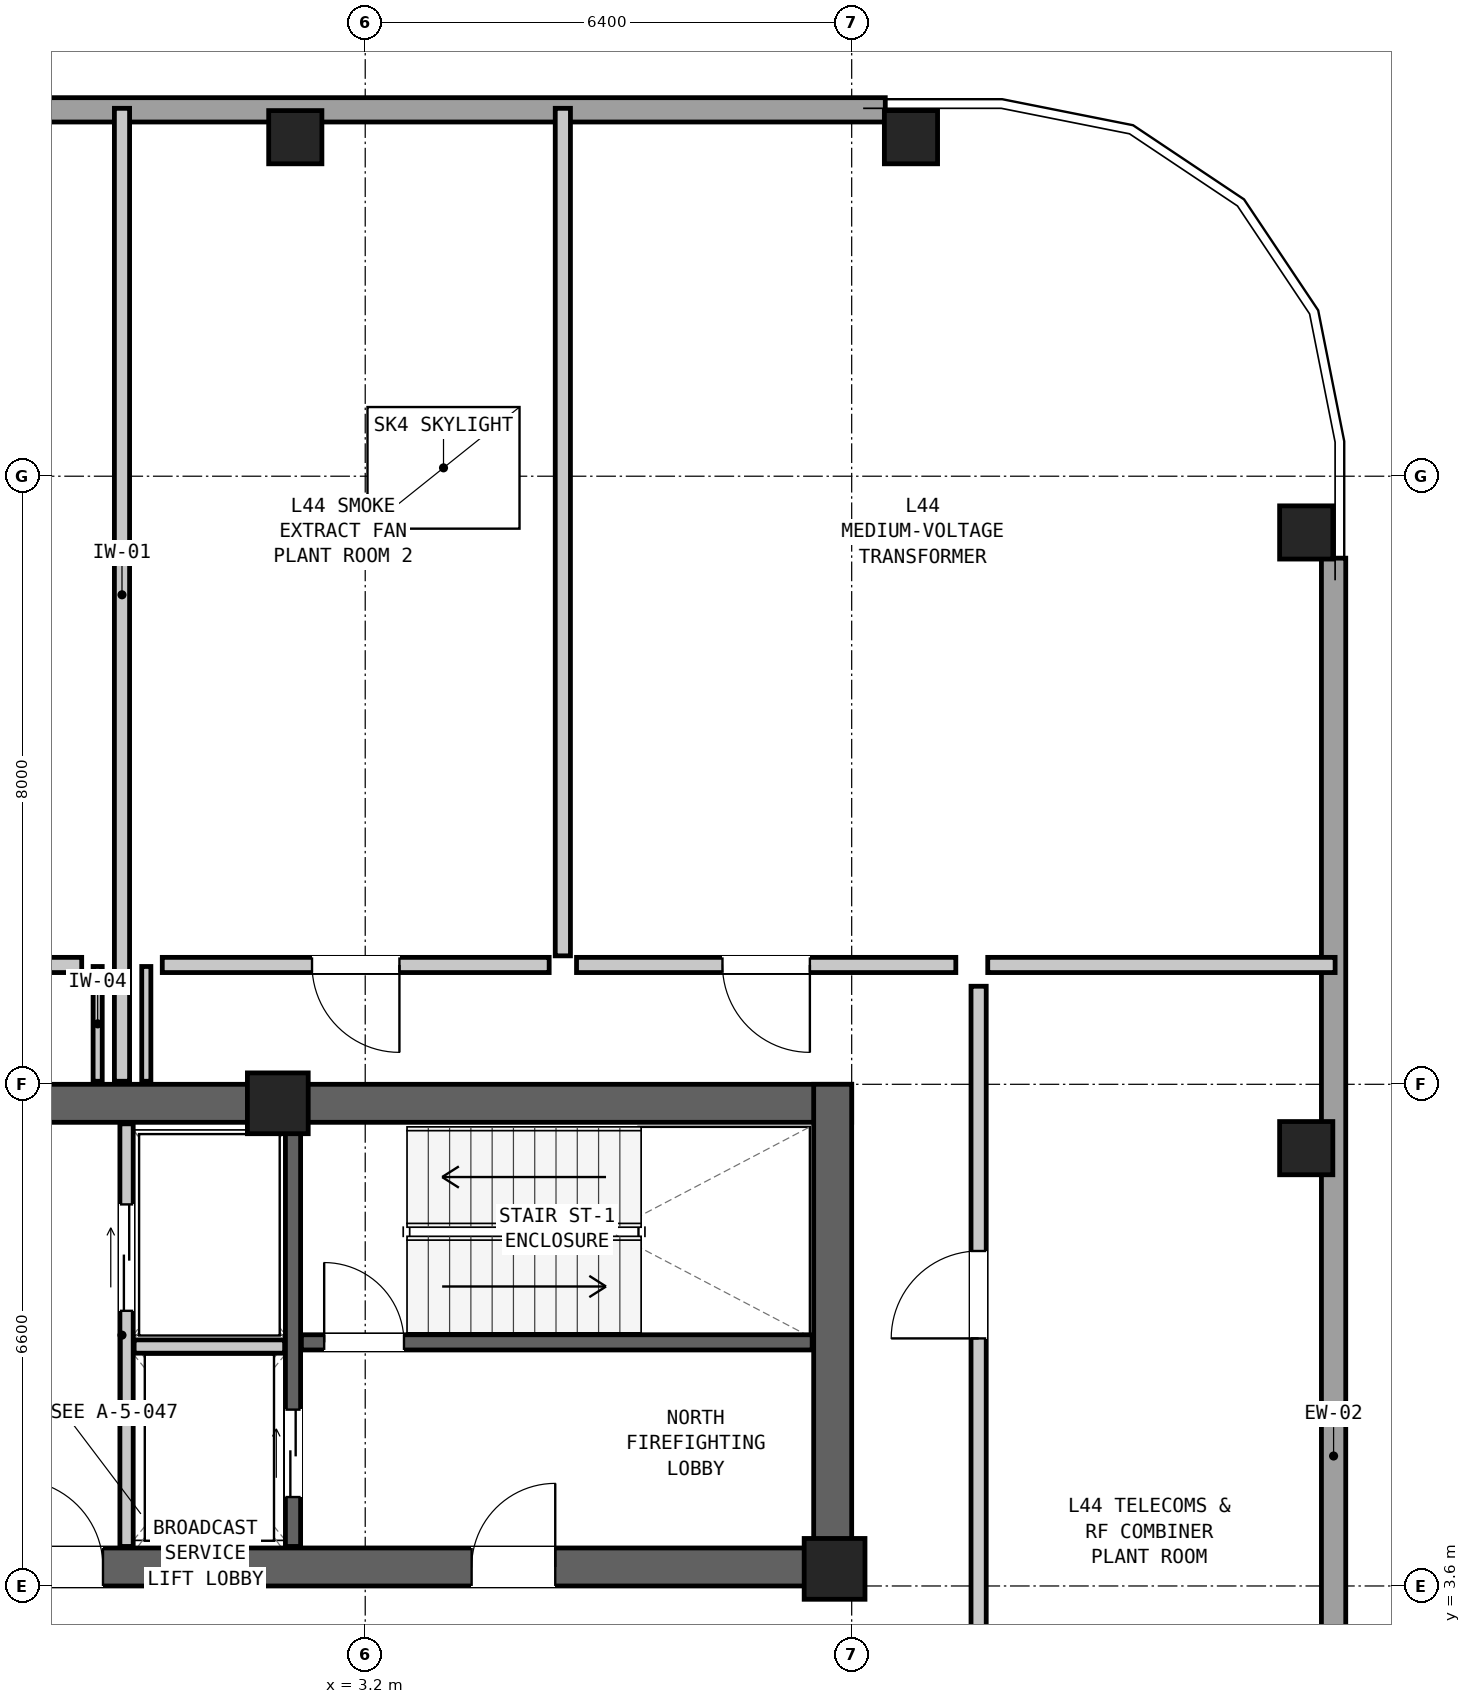
"""IFC4 building model, lengths in metres.
Left out: names, types, materials, properties, quantities, classifications, styles, units other than length and angle.
Written with IfcOpenShell. Run it as: python <this file> out.ifc"""

import sys

from ifc_helpers import new_model, si_unit, direction, frame, frame_2d, origin, origin_2d, place, context, subcontext, project, spatial, rectangle, hollow_rectangle, extrude, element, fill, save


model = new_model("IFC4")
c1 = context("Model", 3, precision=1e-05, world=origin(), true_north=direction((0.0, 1.0)))
c2 = subcontext(c1, "Body", "Model", "MODEL_VIEW")
j1 = project(units=[si_unit("LENGTHUNIT", "METRE"), si_unit("PLANEANGLEUNIT", "RADIAN")], contexts=[c1])
p1 = place(None, origin())
s1 = spatial("IfcSite", under=j1, at=p1, CompositionType="ELEMENT")
p2 = place(p1, origin())
s2 = spatial("IfcBuilding", under=s1, at=p2, CompositionType="ELEMENT")
p3 = place(p2, frame((0.0, 0.0, 151.8)))
s3 = spatial("IfcBuildingStorey", under=s2, at=p3, CompositionType="ELEMENT", Elevation=151.8)
p4 = place(p3, frame((-9.6, 9.95, 0.0), z_axis=(0.0, 0.0, 1.0), x_axis=(1.0, 0.0, 0.0)))
e1 = element("IfcWall", 1, at=p4, inside=s3, PredefinedType="SHEAR", context=c2, shape_type="SweptSolid", body=[
    extrude(rectangle(XDim=19.2, YDim=0.5, at=frame_2d((9.6, 0.0))), origin(), (0.0, 0.0, 1.0), 4.35),
])
p5 = place(p3, frame((-9.6, 3.85, 0.0), z_axis=(0.0, 0.0, 1.0), x_axis=(1.0, 0.0, 0.0)))
e2 = element("IfcWall", 2, at=p5, inside=s3, PredefinedType="SHEAR", context=c2, shape_type="SweptSolid", body=[
    extrude(rectangle(XDim=19.2, YDim=0.5, at=frame_2d((9.6, 0.0))), origin(), (0.0, 0.0, 1.0), 4.35),
])
p6 = place(p5, frame((14.2, 0.0, 0.0)))
e3 = element("IfcOpeningElement", 3, at=p6, cuts=e2, PredefinedType="OPENING", context=c2, shape_type="SweptSolid", body=[
    extrude(rectangle(XDim=1.1, YDim=2.08, at=frame_2d((0.55, 1.04))), frame((0.0, 0.262, 0.0), z_axis=(0.0, -1.0, 0.0), x_axis=(1.0, 0.0, 0.0)), (0.0, 0.0, 1.0), 0.524),
])
p7 = place(p5, frame((8.2, 0.0, 0.0)))
e4 = element("IfcOpeningElement", 4, at=p7, cuts=e2, PredefinedType="OPENING", context=c2, shape_type="SweptSolid", body=[
    extrude(rectangle(XDim=1.15, YDim=2.1, at=frame_2d((0.575, 1.05))), frame((0.0, 0.262, 0.0), z_axis=(0.0, -1.0, 0.0), x_axis=(1.0, 0.0, 0.0)), (0.0, 0.0, 1.0), 0.524),
])
p8 = place(p5, frame((2.5, 0.0, 0.0)))
e5 = element("IfcOpeningElement", 5, at=p8, cuts=e2, PredefinedType="OPENING", context=c2, shape_type="SweptSolid", body=[
    extrude(rectangle(XDim=1.6, YDim=2.12, at=frame_2d((0.8, 1.06))), frame((0.0, 0.262, 0.0), z_axis=(0.0, -1.0, 0.0), x_axis=(1.0, 0.0, 0.0)), (0.0, 0.0, 1.0), 0.524),
])
p9 = place(p3, frame((9.35, 3.6, 0.0), z_axis=(0.0, 0.0, 1.0), x_axis=(0.0, 1.0, 0.0)))
e6 = element("IfcWall", 6, at=p9, inside=s3, PredefinedType="SHEAR", context=c2, shape_type="SweptSolid", body=[
    extrude(rectangle(XDim=6.6, YDim=0.5, at=frame_2d((3.3, 0.0))), origin(), (0.0, 0.0, 1.0), 4.35),
])
for number, where, z_axis, x_axis in (
    (7, (15.58, 9.36, 0.0), (0.0, 0.0, 1.0), (0.0, 1.0, 0.0)),
    (8, (15.58, 17.46, 0.0), (0.0, 0.0, 1.0), (0.0, 1.0, 0.0)),
    (9, (10.38, 22.66, 0.0), (0.0, 0.0, 1.0), (1.0, 0.0, 0.0)),
    (10, (2.28, 22.66, 0.0), (0.0, 0.0, 1.0), (1.0, 0.0, 0.0)),
):
    element("IfcColumn", number, at=place(p3, frame(where, z_axis=z_axis, x_axis=x_axis)), inside=s3, PredefinedType="COLUMN", context=c2, shape_type="SweptSolid", body=[
        extrude(hollow_rectangle(XDim=0.7, YDim=0.7, WallThickness=0.045, at=origin_2d()), origin(), (0.0, 0.0, 1.0), 4.35),
    ])
for number, where, z_axis, x_axis in (
    (11, (2.05, 9.95, 0.0), (0.0, 0.0, 1.0), (1.0, 0.0, 0.0)),
    (12, (9.375, 3.825, 0.0), (0.0, 0.0, 1.0), (1.0, 0.0, 0.0)),
):
    element("IfcColumn", number, at=place(p3, frame(where, z_axis=z_axis, x_axis=x_axis)), inside=s3, PredefinedType="COLUMN", context=c2, shape_type="SweptSolid", body=[
        extrude(rectangle(XDim=0.8, YDim=0.8, at=origin_2d()), origin(), (0.0, 0.0, 1.0), 4.35),
    ])
p10 = place(p3, frame((15.94, 17.122, 0.0), z_axis=(0.0, 0.0, 1.0), x_axis=(0.0, -1.0, 0.0)))
e13 = element("IfcWall", 13, at=p10, inside=s3, PredefinedType="SOLIDWALL", context=c2, shape_type="SweptSolid", body=[
    extrude(rectangle(XDim=23.624, YDim=0.32, at=frame_2d((11.812, 0.0))), origin(), (0.0, 0.0, 1.0), 2.31),
])
p11 = place(p3, frame((-13.582, 23.02, 0.0), z_axis=(0.0, 0.0, 1.0), x_axis=(1.0, 0.0, 0.0)))
e14 = element("IfcWall", 14, at=p11, inside=s3, PredefinedType="SOLIDWALL", context=c2, shape_type="SweptSolid", body=[
    extrude(rectangle(XDim=23.624, YDim=0.32, at=frame_2d((11.812, 0.0))), origin(), (0.0, 0.0, 1.0), 2.11),
])
p12 = place(p3, frame((2.36, 6.805, 0.0), z_axis=(0.0, 0.0, 1.0), x_axis=(1.0, 0.0, 0.0)))
e15 = element("IfcWall", 15, at=p12, inside=s3, PredefinedType="SHEAR", context=c2, shape_type="SweptSolid", body=[
    extrude(rectangle(XDim=6.72, YDim=0.2, at=frame_2d((3.36, 0.0))), origin(), (0.0, 0.0, 1.0), 4.13),
])
p13 = place(p12, frame((0.3, 0.0, 0.0)))
e16 = element("IfcOpeningElement", 16, at=p13, cuts=e15, PredefinedType="OPENING", context=c2, shape_type="SweptSolid", body=[
    extrude(rectangle(XDim=1.05, YDim=2.08, at=frame_2d((0.525, 1.04))), frame((0.0, 0.112, 0.0), z_axis=(0.0, -1.0, 0.0), x_axis=(1.0, 0.0, 0.0)), (0.0, 0.0, 1.0), 0.224),
])
p14 = place(p3, frame((2.25, 4.12, 0.0), z_axis=(0.0, 0.0, 1.0), x_axis=(0.0, 1.0, 0.0)))
e17 = element("IfcWall", 17, at=p14, inside=s3, PredefinedType="SHEAR", context=c2, shape_type="SweptSolid", body=[
    extrude(rectangle(XDim=5.56, YDim=0.2, at=frame_2d((2.78, 0.0))), origin(), (0.0, 0.0, 1.0), 4.13),
])
p15 = place(p14, frame((0.65, 0.0, 0.0)))
e18 = element("IfcOpeningElement", 18, at=p15, cuts=e17, PredefinedType="OPENING", context=c2, shape_type="SweptSolid", body=[
    extrude(rectangle(XDim=1.15, YDim=2.08, at=frame_2d((0.575, 1.04))), frame((0.0, 0.112, 0.0), z_axis=(0.0, -1.0, 0.0), x_axis=(1.0, 0.0, 0.0)), (0.0, 0.0, 1.0), 0.224),
])
p16 = place(p3, frame((0.06, 4.12, 0.0), z_axis=(0.0, 0.0, 1.0), x_axis=(0.0, 1.0, 0.0)))
e19 = element("IfcWall", 19, at=p16, inside=s3, PredefinedType="PARTITIONING", context=c2, shape_type="SweptSolid", body=[
    extrude(rectangle(XDim=5.56, YDim=0.175, at=frame_2d((2.78, 0.0))), origin(), (0.0, 0.0, 1.0), 4.13),
])
p17 = place(p16, frame((3.1, 0.0, 0.0)))
e20 = element("IfcOpeningElement", 20, at=p17, cuts=e19, PredefinedType="OPENING", context=c2, shape_type="SweptSolid", body=[
    extrude(rectangle(XDim=1.4, YDim=2.12, at=frame_2d((0.7, 1.06))), frame((0.0, 0.1, 0.0), z_axis=(0.0, -1.0, 0.0), x_axis=(1.0, 0.0, 0.0)), (0.0, 0.0, 1.0), 0.199),
])
p18 = place(p3, frame((0.16, 6.75, 0.0), z_axis=(0.0, 0.0, 1.0), x_axis=(1.0, 0.0, 0.0)))
e21 = element("IfcWall", 21, at=p18, inside=s3, PredefinedType="PARTITIONING", context=c2, shape_type="SweptSolid", body=[
    extrude(rectangle(XDim=1.98, YDim=0.175, at=frame_2d((0.99, 0.0))), origin(), (0.0, 0.0, 1.0), 4.13),
])
p19 = place(p3, frame((0.0, 10.24, 0.0), z_axis=(0.0, 0.0, 1.0), x_axis=(0.0, 1.0, 0.0)))
e22 = element("IfcWall", 22, at=p19, inside=s3, PredefinedType="PARTITIONING", context=c2, shape_type="SweptSolid", body=[
    extrude(rectangle(XDim=12.8, YDim=0.2, at=frame_2d((6.4, 0.0))), origin(), (0.0, 0.0, 1.0), 2.31),
])
for number, where, z_axis, x_axis in (
    (23, (-0.32, 10.24, 0.0), (0.0, 0.0, 1.0), (0.0, 1.0, 0.0)),
    (24, (0.32, 10.24, 0.0), (0.0, 0.0, 1.0), (0.0, 1.0, 0.0)),
):
    element("IfcWall", number, at=place(p3, frame(where, z_axis=z_axis, x_axis=x_axis)), inside=s3, PredefinedType="PARTITIONING", context=c2, shape_type="SweptSolid", body=[
        extrude(rectangle(XDim=1.51, YDim=0.12, at=frame_2d((0.755, 0.0))), origin(), (0.0, 0.0, 1.0), 2.31),
    ])
p20 = place(p3, frame((-0.53, 11.77, 0.0), z_axis=(0.0, 0.0, 1.0), x_axis=(-1.0, 0.0, 0.0)))
e25 = element("IfcWall", 25, at=p20, inside=s3, PredefinedType="PARTITIONING", context=c2, shape_type="SweptSolid", body=[
    extrude(rectangle(XDim=5.09, YDim=0.2, at=frame_2d((2.545, 0.0))), origin(), (0.0, 0.0, 1.0), 4.13),
])
p21 = place(p20, frame((1.97, 0.0, 0.0)))
e26 = element("IfcOpeningElement", 26, at=p21, cuts=e25, PredefinedType="OPENING", context=c2, shape_type="SweptSolid", body=[
    extrude(rectangle(XDim=1.15, YDim=2.1, at=frame_2d((0.575, 1.05))), frame((0.0, 0.112, 0.0), z_axis=(0.0, -1.0, 0.0), x_axis=(1.0, 0.0, 0.0)), (0.0, 0.0, 1.0), 0.224),
])
p22 = place(p3, frame((5.62, 11.77, 0.0), z_axis=(0.0, 0.0, 1.0), x_axis=(-1.0, 0.0, 0.0)))
e27 = element("IfcWall", 27, at=p22, inside=s3, PredefinedType="PARTITIONING", context=c2, shape_type="SweptSolid", body=[
    extrude(rectangle(XDim=5.09, YDim=0.2, at=frame_2d((2.545, 0.0))), origin(), (0.0, 0.0, 1.0), 4.13),
])
p23 = place(p22, frame((1.97, 0.0, 0.0)))
e28 = element("IfcOpeningElement", 28, at=p23, cuts=e27, PredefinedType="OPENING", context=c2, shape_type="SweptSolid", body=[
    extrude(rectangle(XDim=1.15, YDim=2.1, at=frame_2d((0.575, 1.05))), frame((0.0, 0.112, 0.0), z_axis=(0.0, -1.0, 0.0), x_axis=(1.0, 0.0, 0.0)), (0.0, 0.0, 1.0), 0.224),
])
p24 = place(p3, frame((5.8, 11.89, 0.0), z_axis=(0.0, 0.0, 1.0), x_axis=(0.0, 1.0, 0.0)))
e29 = element("IfcWall", 29, at=p24, inside=s3, PredefinedType="PARTITIONING", context=c2, shape_type="SweptSolid", body=[
    extrude(rectangle(XDim=11.15, YDim=0.2, at=frame_2d((5.575, 0.0))), origin(), (0.0, 0.0, 1.0), 3.647),
])
p25 = place(p3, frame((10.97, 11.77, 0.0), z_axis=(0.0, 0.0, 1.0), x_axis=(-1.0, 0.0, 0.0)))
e30 = element("IfcWall", 30, at=p25, inside=s3, PredefinedType="PARTITIONING", context=c2, shape_type="SweptSolid", body=[
    extrude(rectangle(XDim=4.99, YDim=0.2, at=frame_2d((2.495, 0.0))), origin(), (0.0, 0.0, 1.0), 4.13),
])
p26 = place(p25, frame((1.92, 0.0, 0.0)))
e31 = element("IfcOpeningElement", 31, at=p26, cuts=e30, PredefinedType="OPENING", context=c2, shape_type="SweptSolid", body=[
    extrude(rectangle(XDim=1.15, YDim=2.1, at=frame_2d((0.575, 1.05))), frame((0.0, 0.112, 0.0), z_axis=(0.0, -1.0, 0.0), x_axis=(1.0, 0.0, 0.0)), (0.0, 0.0, 1.0), 0.224),
])
p27 = place(p3, frame((11.39, 11.77, 0.0), z_axis=(0.0, 0.0, 1.0), x_axis=(1.0, 0.0, 0.0)))
e32 = element("IfcWall", 32, at=p27, inside=s3, PredefinedType="PARTITIONING", context=c2, shape_type="SweptSolid", body=[
    extrude(rectangle(XDim=4.57, YDim=0.2, at=frame_2d((2.285, 0.0))), origin(), (0.0, 0.0, 1.0), 4.13),
])
p28 = place(p3, frame((11.27, 0.81, 0.0), z_axis=(0.0, 0.0, 1.0), x_axis=(0.0, 1.0, 0.0)))
e33 = element("IfcWall", 33, at=p28, inside=s3, PredefinedType="PARTITIONING", context=c2, shape_type="SweptSolid", body=[
    extrude(rectangle(XDim=10.68, YDim=0.2, at=frame_2d((5.34, 0.0))), origin(), (0.0, 0.0, 1.0), 4.13),
])
p29 = place(p28, frame((6.047, 0.0, 0.0)))
e34 = element("IfcOpeningElement", 34, at=p29, cuts=e33, PredefinedType="OPENING", context=c2, shape_type="SweptSolid", body=[
    extrude(rectangle(XDim=1.15, YDim=2.1, at=frame_2d((0.575, 1.05))), frame((0.0, 0.112, 0.0), z_axis=(0.0, -1.0, 0.0), x_axis=(1.0, 0.0, 0.0)), (0.0, 0.0, 1.0), 0.224),
])
p30 = place(p3, frame((0.0, 0.0, -0.38)))
p31 = place(p30, frame((4.23, 18.31, 0.0), z_axis=(0.0, 0.0, 1.0), x_axis=(1.0, 0.0, 0.0)))
p32 = place(p31, frame((0.0, 0.0, 0.33)))
e35 = element("IfcWindow", 35, at=p32, inside=s3, PartitioningType="SINGLE_PANEL", PredefinedType="SKYLIGHT", context=c2, shape_type="SweptSolid", body=[
    extrude(rectangle(XDim=2.0, YDim=1.6, at=origin_2d()), origin(), (0.0, 0.0, 1.0), 0.05),
])
p33 = place(p13, origin())
e36 = element("IfcDoor", 36, at=p33, inside=s3, OperationType="SINGLE_SWING_LEFT", PredefinedType="DOOR", context=c2, shape_type="SweptSolid", body=[
    extrude(rectangle(XDim=1.05, YDim=2.08, at=frame_2d((0.525, 1.04))), frame((0.0, 0.025, 0.0), z_axis=(0.0, -1.0, 0.0), x_axis=(1.0, 0.0, 0.0)), (0.0, 0.0, 1.0), 0.05),
])
fill(e16, e36)
p34 = place(p6, origin())
e37 = element("IfcDoor", 37, at=p34, inside=s3, OperationType="SINGLE_SWING_RIGHT", PredefinedType="DOOR", context=c2, shape_type="SweptSolid", body=[
    extrude(rectangle(XDim=1.1, YDim=2.08, at=frame_2d((0.55, 1.04))), frame((0.0, 0.025, 0.0), z_axis=(0.0, -1.0, 0.0), x_axis=(1.0, 0.0, 0.0)), (0.0, 0.0, 1.0), 0.05),
])
fill(e3, e37)
p35 = place(p15, origin())
e38 = element("IfcDoor", 38, at=p35, inside=s3, OperationType="DOUBLE_DOOR_SLIDING", PredefinedType="DOOR", context=c2, shape_type="SweptSolid", body=[
    extrude(rectangle(XDim=1.15, YDim=2.08, at=frame_2d((0.575, 1.04))), frame((0.0, 0.025, 0.0), z_axis=(0.0, -1.0, 0.0), x_axis=(1.0, 0.0, 0.0)), (0.0, 0.0, 1.0), 0.05),
])
fill(e18, e38)
p36 = place(p17, origin())
e39 = element("IfcDoor", 39, at=p36, inside=s3, OperationType="DOUBLE_DOOR_SLIDING", PredefinedType="DOOR", context=c2, shape_type="SweptSolid", body=[
    extrude(rectangle(XDim=1.4, YDim=2.12, at=frame_2d((0.7, 1.06))), frame((0.0, 0.025, 0.0), z_axis=(0.0, -1.0, 0.0), x_axis=(1.0, 0.0, 0.0)), (0.0, 0.0, 1.0), 0.05),
])
fill(e20, e39)
p37 = place(p7, origin())
e40 = element("IfcDoor", 40, at=p37, inside=s3, OperationType="SINGLE_SWING_LEFT", PredefinedType="DOOR", context=c2, shape_type="SweptSolid", body=[
    extrude(rectangle(XDim=1.15, YDim=2.1, at=frame_2d((0.575, 1.05))), frame((0.0, 0.025, 0.0), z_axis=(0.0, -1.0, 0.0), x_axis=(1.0, 0.0, 0.0)), (0.0, 0.0, 1.0), 0.05),
])
fill(e4, e40)
p38 = place(p23, origin())
e41 = element("IfcDoor", 41, at=p38, inside=s3, OperationType="SINGLE_SWING_LEFT", PredefinedType="DOOR", context=c2, shape_type="SweptSolid", body=[
    extrude(rectangle(XDim=1.15, YDim=2.1, at=frame_2d((0.575, 1.05))), frame((0.0, 0.025, 0.0), z_axis=(0.0, -1.0, 0.0), x_axis=(1.0, 0.0, 0.0)), (0.0, 0.0, 1.0), 0.05),
])
fill(e28, e41)
p39 = place(p26, origin())
e42 = element("IfcDoor", 42, at=p39, inside=s3, OperationType="SINGLE_SWING_LEFT", PredefinedType="DOOR", context=c2, shape_type="SweptSolid", body=[
    extrude(rectangle(XDim=1.15, YDim=2.1, at=frame_2d((0.575, 1.05))), frame((0.0, 0.025, 0.0), z_axis=(0.0, -1.0, 0.0), x_axis=(1.0, 0.0, 0.0)), (0.0, 0.0, 1.0), 0.05),
])
fill(e31, e42)
p40 = place(p29, origin())
e43 = element("IfcDoor", 43, at=p40, inside=s3, OperationType="SINGLE_SWING_LEFT", PredefinedType="DOOR", context=c2, shape_type="SweptSolid", body=[
    extrude(rectangle(XDim=1.15, YDim=2.1, at=frame_2d((0.575, 1.05))), frame((0.0, 0.025, 0.0), z_axis=(0.0, -1.0, 0.0), x_axis=(1.0, 0.0, 0.0)), (0.0, 0.0, 1.0), 0.05),
])
fill(e34, e43)
save(model, sys.argv[1])
